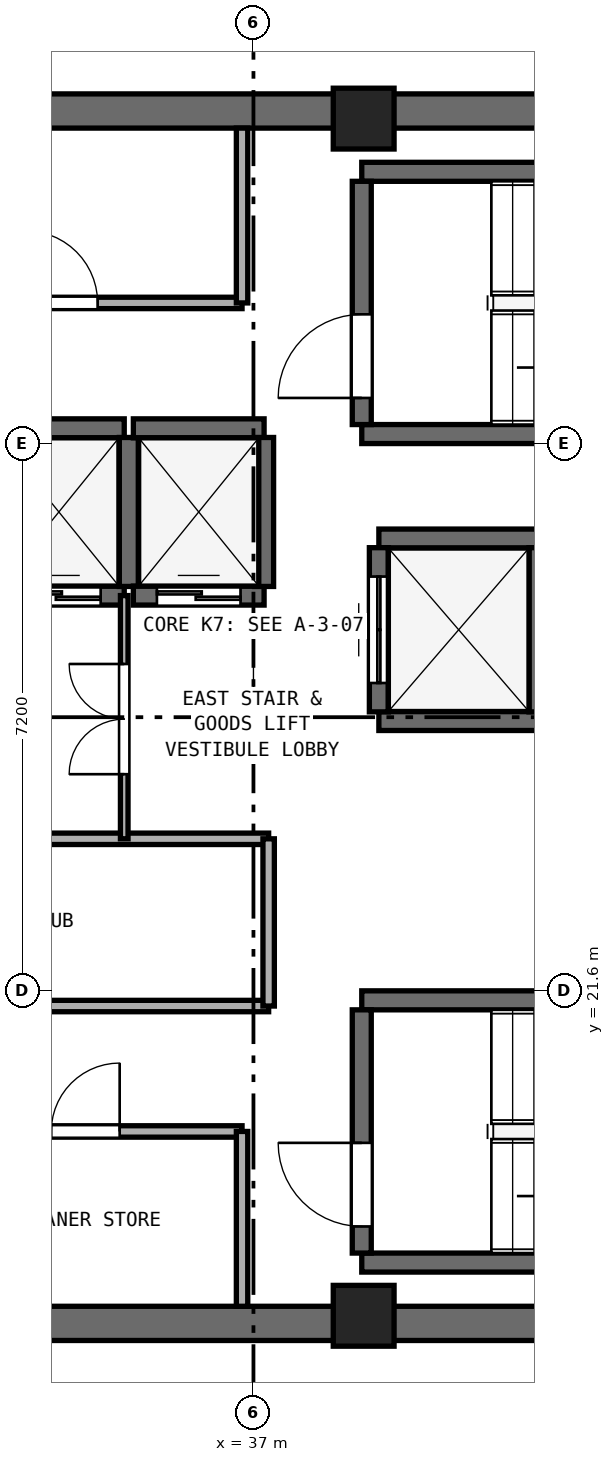
"""IFC4 building model, lengths in metres.
Left out: names, types, materials, properties, quantities, classifications, styles, units other than length and angle.
Written with IfcOpenShell. Run it as: python <this file> out.ifc"""

import sys

from ifc_helpers import new_model, si_unit, direction, frame, frame_2d, origin, origin_2d, place, context, subcontext, project, spatial, rectangle, extrude, element, fill, save


model = new_model("IFC4")
c1 = context("Model", 3, precision=1e-05, world=origin(), true_north=direction((0.0, 1.0)))
c2 = subcontext(c1, "Body", "Model", "MODEL_VIEW")
j1 = project(units=[si_unit("LENGTHUNIT", "METRE"), si_unit("PLANEANGLEUNIT", "RADIAN")], contexts=[c1])
p1 = place(None, origin())
s1 = spatial("IfcSite", under=j1, at=p1, CompositionType="ELEMENT")
p2 = place(p1, origin())
s2 = spatial("IfcBuilding", under=s1, at=p2, CompositionType="ELEMENT")
p3 = place(p2, frame((0.0, 0.0, 301.0)))
s3 = spatial("IfcBuildingStorey", under=s2, at=p3, CompositionType="ELEMENT", Elevation=301.0)
for number, where, z_axis, x_axis in (
    (1, (25.4, 17.225, 0.0), (0.0, 0.0, 1.0), (1.0, 0.0, 0.0)),
    (2, (25.4, 33.175, 0.0), (0.0, 0.0, 1.0), (1.0, 0.0, 0.0)),
):
    element("IfcWall", number, at=place(p3, frame(where, z_axis=z_axis, x_axis=x_axis)), inside=s3, PredefinedType="SHEAR", context=c2, shape_type="SweptSolid", body=[
        extrude(rectangle(XDim=23.2, YDim=0.45, at=frame_2d((11.6, 0.0))), origin(), (0.0, 0.0, 1.0), 3.54),
    ])
for number, where, z_axis, x_axis in (
    (3, (38.45, 17.325, 0.0), (0.0, 0.0, 1.0), (1.0, 0.0, 0.0)),
    (4, (38.45, 33.075, 0.0), (0.0, 0.0, 1.0), (1.0, 0.0, 0.0)),
):
    element("IfcColumn", number, at=place(p3, frame(where, z_axis=z_axis, x_axis=x_axis)), inside=s3, PredefinedType="PILASTER", context=c2, shape_type="SweptSolid", body=[
        extrude(rectangle(XDim=0.8, YDim=0.8, at=origin_2d()), origin(), (0.0, 0.0, 1.0), 3.8),
    ])
for number, where, z_axis, x_axis in (
    (5, (38.425, 28.925, 0.0), (0.0, 0.0, 1.0), (1.0, 0.0, 0.0)),
    (6, (38.425, 32.375, 0.0), (0.0, 0.0, 1.0), (1.0, 0.0, 0.0)),
):
    element("IfcWall", number, at=place(p3, frame(where, z_axis=z_axis, x_axis=x_axis)), inside=s3, PredefinedType="SHEAR", context=c2, shape_type="SweptSolid", body=[
        extrude(rectangle(XDim=7.3, YDim=0.25, at=frame_2d((3.65, 0.0))), origin(), (0.0, 0.0, 1.0), 3.54),
    ])
p4 = place(p3, frame((38.425, 29.05, 0.0), z_axis=(0.0, 0.0, 1.0), x_axis=(0.0, 1.0, 0.0)))
e7 = element("IfcWall", 7, at=p4, inside=s3, PredefinedType="SHEAR", context=c2, shape_type="SweptSolid", body=[
    extrude(rectangle(XDim=3.2, YDim=0.25, at=frame_2d((1.6, 0.0))), origin(), (0.0, 0.0, 1.0), 3.54),
])
p5 = place(p4, frame((0.35, 0.0, 0.0)))
e8 = element("IfcOpeningElement", 8, at=p5, cuts=e7, PredefinedType="OPENING", context=c2, shape_type="SweptSolid", body=[
    extrude(rectangle(XDim=1.1, YDim=2.15, at=frame_2d((0.55, 1.075))), frame((0.0, 0.135, 0.0), z_axis=(0.0, -1.0, 0.0), x_axis=(1.0, 0.0, 0.0)), (0.0, 0.0, 1.0), 0.27),
])
for number, where, z_axis, x_axis in (
    (9, (38.425, 18.025, 0.0), (0.0, 0.0, 1.0), (1.0, 0.0, 0.0)),
    (10, (38.425, 21.475, 0.0), (0.0, 0.0, 1.0), (1.0, 0.0, 0.0)),
):
    element("IfcWall", number, at=place(p3, frame(where, z_axis=z_axis, x_axis=x_axis)), inside=s3, PredefinedType="SHEAR", context=c2, shape_type="SweptSolid", body=[
        extrude(rectangle(XDim=7.3, YDim=0.25, at=frame_2d((3.65, 0.0))), origin(), (0.0, 0.0, 1.0), 3.54),
    ])
p6 = place(p3, frame((38.425, 18.15, 0.0), z_axis=(0.0, 0.0, 1.0), x_axis=(0.0, 1.0, 0.0)))
e11 = element("IfcWall", 11, at=p6, inside=s3, PredefinedType="SHEAR", context=c2, shape_type="SweptSolid", body=[
    extrude(rectangle(XDim=3.2, YDim=0.25, at=frame_2d((1.6, 0.0))), origin(), (0.0, 0.0, 1.0), 3.54),
])
p7 = place(p6, frame((0.35, 0.0, 0.0)))
e12 = element("IfcOpeningElement", 12, at=p7, cuts=e11, PredefinedType="OPENING", context=c2, shape_type="SweptSolid", body=[
    extrude(rectangle(XDim=1.1, YDim=2.15, at=frame_2d((0.55, 1.075))), frame((0.0, 0.135, 0.0), z_axis=(0.0, -1.0, 0.0), x_axis=(1.0, 0.0, 0.0)), (0.0, 0.0, 1.0), 0.27),
])
p8 = place(p3, frame((33.58, 26.8, 0.0), z_axis=(0.0, 0.0, 1.0), x_axis=(1.0, 0.0, 0.0)))
e13 = element("IfcWall", 13, at=p8, inside=s3, PredefinedType="SHEAR", context=c2, shape_type="SweptSolid", body=[
    extrude(rectangle(XDim=1.72, YDim=0.25, at=frame_2d((0.86, 0.0))), origin(), (0.0, 0.0, 1.0), 3.54),
])
p9 = place(p8, frame((0.31, 0.0, 0.0)))
e14 = element("IfcOpeningElement", 14, at=p9, cuts=e13, PredefinedType="OPENING", context=c2, shape_type="SweptSolid", body=[
    extrude(rectangle(XDim=1.1, YDim=2.15, at=frame_2d((0.55, 1.075))), frame((0.0, 0.135, 0.0), z_axis=(0.0, -1.0, 0.0), x_axis=(1.0, 0.0, 0.0)), (0.0, 0.0, 1.0), 0.27),
])
p10 = place(p3, frame((33.58, 29.0, 0.0), z_axis=(0.0, 0.0, 1.0), x_axis=(1.0, 0.0, 0.0)))
e15 = element("IfcWall", 15, at=p10, inside=s3, PredefinedType="SHEAR", context=c2, shape_type="SweptSolid", body=[
    extrude(rectangle(XDim=1.72, YDim=0.25, at=frame_2d((0.86, 0.0))), origin(), (0.0, 0.0, 1.0), 3.54),
])
p11 = place(p3, frame((35.36, 26.92, 0.0), z_axis=(0.0, 0.0, 1.0), x_axis=(0.0, 1.0, 0.0)))
e16 = element("IfcWall", 16, at=p11, inside=s3, PredefinedType="SHEAR", context=c2, shape_type="SweptSolid", body=[
    extrude(rectangle(XDim=1.96, YDim=0.25, at=frame_2d((0.98, 0.0))), origin(), (0.0, 0.0, 1.0), 3.54),
])
p12 = place(p3, frame((35.42, 26.8, 0.0), z_axis=(0.0, 0.0, 1.0), x_axis=(1.0, 0.0, 0.0)))
e17 = element("IfcWall", 17, at=p12, inside=s3, PredefinedType="SHEAR", context=c2, shape_type="SweptSolid", body=[
    extrude(rectangle(XDim=1.72, YDim=0.25, at=frame_2d((0.86, 0.0))), origin(), (0.0, 0.0, 1.0), 3.54),
])
p13 = place(p12, frame((0.31, 0.0, 0.0)))
e18 = element("IfcOpeningElement", 18, at=p13, cuts=e17, PredefinedType="OPENING", context=c2, shape_type="SweptSolid", body=[
    extrude(rectangle(XDim=1.1, YDim=2.15, at=frame_2d((0.55, 1.075))), frame((0.0, 0.135, 0.0), z_axis=(0.0, -1.0, 0.0), x_axis=(1.0, 0.0, 0.0)), (0.0, 0.0, 1.0), 0.27),
])
p14 = place(p3, frame((35.42, 29.0, 0.0), z_axis=(0.0, 0.0, 1.0), x_axis=(1.0, 0.0, 0.0)))
e19 = element("IfcWall", 19, at=p14, inside=s3, PredefinedType="SHEAR", context=c2, shape_type="SweptSolid", body=[
    extrude(rectangle(XDim=1.72, YDim=0.25, at=frame_2d((0.86, 0.0))), origin(), (0.0, 0.0, 1.0), 3.54),
])
p15 = place(p3, frame((37.14, 26.92, 0.0), z_axis=(0.0, 0.0, 1.0), x_axis=(0.0, 1.0, 0.0)))
e20 = element("IfcWall", 20, at=p15, inside=s3, PredefinedType="SHEAR", context=c2, shape_type="SweptSolid", body=[
    extrude(rectangle(XDim=1.96, YDim=0.25, at=frame_2d((0.98, 0.0))), origin(), (0.0, 0.0, 1.0), 3.54),
])
for number, where, z_axis, x_axis in (
    (21, (38.65, 25.15, 0.0), (0.0, 0.0, 1.0), (1.0, 0.0, 0.0)),
    (22, (38.65, 27.55, 0.0), (0.0, 0.0, 1.0), (1.0, 0.0, 0.0)),
):
    element("IfcWall", number, at=place(p3, frame(where, z_axis=z_axis, x_axis=x_axis)), inside=s3, PredefinedType="SHEAR", context=c2, shape_type="SweptSolid", body=[
        extrude(rectangle(XDim=2.1, YDim=0.25, at=frame_2d((1.05, 0.0))), origin(), (0.0, 0.0, 1.0), 3.54),
    ])
p16 = place(p3, frame((38.65, 25.27, 0.0), z_axis=(0.0, 0.0, 1.0), x_axis=(0.0, 1.0, 0.0)))
e23 = element("IfcWall", 23, at=p16, inside=s3, PredefinedType="SHEAR", context=c2, shape_type="SweptSolid", body=[
    extrude(rectangle(XDim=2.16, YDim=0.25, at=frame_2d((1.08, 0.0))), origin(), (0.0, 0.0, 1.0), 3.54),
])
p17 = place(p16, frame((0.38, 0.0, 0.0)))
e24 = element("IfcOpeningElement", 24, at=p17, cuts=e23, PredefinedType="OPENING", context=c2, shape_type="SweptSolid", body=[
    extrude(rectangle(XDim=1.4, YDim=2.2, at=frame_2d((0.7, 1.1))), frame((0.0, 0.135, 0.0), z_axis=(0.0, -1.0, 0.0), x_axis=(1.0, 0.0, 0.0)), (0.0, 0.0, 1.0), 0.27),
])
p18 = place(p3, frame((40.75, 25.27, 0.0), z_axis=(0.0, 0.0, 1.0), x_axis=(0.0, 1.0, 0.0)))
e25 = element("IfcWall", 25, at=p18, inside=s3, PredefinedType="SHEAR", context=c2, shape_type="SweptSolid", body=[
    extrude(rectangle(XDim=2.16, YDim=0.25, at=frame_2d((1.08, 0.0))), origin(), (0.0, 0.0, 1.0), 3.54),
])
p19 = place(p3, frame((32.1, 30.65, 0.0), z_axis=(0.0, 0.0, 1.0), x_axis=(1.0, 0.0, 0.0)))
e26 = element("IfcWall", 26, at=p19, inside=s3, PredefinedType="PARTITIONING", context=c2, shape_type="SweptSolid", body=[
    extrude(rectangle(XDim=4.75, YDim=0.15, at=frame_2d((2.375, 0.0))), origin(), (0.0, 0.0, 1.0), 3.54),
])
p20 = place(p19, frame((1.9, 0.0, 0.0)))
e27 = element("IfcOpeningElement", 27, at=p20, cuts=e26, PredefinedType="OPENING", context=c2, shape_type="SweptSolid", body=[
    extrude(rectangle(XDim=0.95, YDim=2.1, at=frame_2d((0.475, 1.05))), frame((0.0, 0.085, 0.0), z_axis=(0.0, -1.0, 0.0), x_axis=(1.0, 0.0, 0.0)), (0.0, 0.0, 1.0), 0.17),
])
p21 = place(p3, frame((36.85, 30.65, 0.0), z_axis=(0.0, 0.0, 1.0), x_axis=(0.0, 1.0, 0.0)))
e28 = element("IfcWall", 28, at=p21, inside=s3, PredefinedType="PARTITIONING", context=c2, shape_type="SweptSolid", body=[
    extrude(rectangle(XDim=2.3, YDim=0.15, at=frame_2d((1.15, 0.0))), origin(), (0.0, 0.0, 1.0), 3.54),
])
p22 = place(p3, frame((32.73, 19.75, 0.0), z_axis=(0.0, 0.0, 1.0), x_axis=(1.0, 0.0, 0.0)))
e29 = element("IfcWall", 29, at=p22, inside=s3, PredefinedType="PARTITIONING", context=c2, shape_type="SweptSolid", body=[
    extrude(rectangle(XDim=4.12, YDim=0.15, at=frame_2d((2.06, 0.0))), origin(), (0.0, 0.0, 1.0), 3.54),
])
p23 = place(p22, frame((1.61, 0.0, 0.0)))
e30 = element("IfcOpeningElement", 30, at=p23, cuts=e29, PredefinedType="OPENING", context=c2, shape_type="SweptSolid", body=[
    extrude(rectangle(XDim=0.9, YDim=2.1, at=frame_2d((0.45, 1.05))), frame((0.0, 0.085, 0.0), z_axis=(0.0, -1.0, 0.0), x_axis=(1.0, 0.0, 0.0)), (0.0, 0.0, 1.0), 0.17),
])
p24 = place(p3, frame((36.85, 17.45, 0.0), z_axis=(0.0, 0.0, 1.0), x_axis=(0.0, 1.0, 0.0)))
e31 = element("IfcWall", 31, at=p24, inside=s3, PredefinedType="PARTITIONING", context=c2, shape_type="SweptSolid", body=[
    extrude(rectangle(XDim=2.3, YDim=0.15, at=frame_2d((1.15, 0.0))), origin(), (0.0, 0.0, 1.0), 3.54),
])
p25 = place(p3, frame((30.08, 21.4, 0.0), z_axis=(0.0, 0.0, 1.0), x_axis=(1.0, 0.0, 0.0)))
e32 = element("IfcWall", 32, at=p25, inside=s3, PredefinedType="PARTITIONING", context=c2, shape_type="SweptSolid", body=[
    extrude(rectangle(XDim=7.12, YDim=0.15, at=frame_2d((3.56, 0.0))), origin(), (0.0, 0.0, 1.0), 3.54),
])
p26 = place(p3, frame((30.08, 23.6, 0.0), z_axis=(0.0, 0.0, 1.0), x_axis=(1.0, 0.0, 0.0)))
e33 = element("IfcWall", 33, at=p26, inside=s3, PredefinedType="PARTITIONING", context=c2, shape_type="SweptSolid", body=[
    extrude(rectangle(XDim=7.12, YDim=0.15, at=frame_2d((3.56, 0.0))), origin(), (0.0, 0.0, 1.0), 3.54),
])
p27 = place(p26, frame((3.11, 0.0, 0.0)))
e34 = element("IfcOpeningElement", 34, at=p27, cuts=e33, PredefinedType="OPENING", context=c2, shape_type="SweptSolid", body=[
    extrude(rectangle(XDim=0.9, YDim=2.1, at=frame_2d((0.45, 1.05))), frame((0.0, 0.085, 0.0), z_axis=(0.0, -1.0, 0.0), x_axis=(1.0, 0.0, 0.0)), (0.0, 0.0, 1.0), 0.17),
])
p28 = place(p3, frame((37.2, 21.4, 0.0), z_axis=(0.0, 0.0, 1.0), x_axis=(0.0, 1.0, 0.0)))
e35 = element("IfcWall", 35, at=p28, inside=s3, PredefinedType="PARTITIONING", context=c2, shape_type="SweptSolid", body=[
    extrude(rectangle(XDim=2.2, YDim=0.15, at=frame_2d((1.1, 0.0))), origin(), (0.0, 0.0, 1.0), 3.54),
])
p29 = place(p3, frame((35.3, 23.6, 0.0), z_axis=(0.0, 0.0, 1.0), x_axis=(0.0, 1.0, 0.0)))
e36 = element("IfcWall", 36, at=p29, inside=s3, PredefinedType="PARTITIONING", context=c2, shape_type="SweptSolid", body=[
    extrude(rectangle(XDim=3.2, YDim=0.1, at=frame_2d((1.6, 0.0))), origin(), (0.0, 0.0, 1.0), 3.54),
])
p30 = place(p29, frame((0.85, 0.0, 0.0)))
e37 = element("IfcOpeningElement", 37, at=p30, cuts=e36, PredefinedType="OPENING", context=c2, shape_type="SweptSolid", body=[
    extrude(rectangle(XDim=1.45, YDim=2.12, at=frame_2d((0.725, 1.06))), frame((0.0, 0.06, 0.0), z_axis=(0.0, -1.0, 0.0), x_axis=(1.0, 0.0, 0.0)), (0.0, 0.0, 1.0), 0.12),
])
p31 = place(p5, origin())
e38 = element("IfcDoor", 38, at=p31, inside=s3, OperationType="SINGLE_SWING_LEFT", PredefinedType="DOOR", context=c2, shape_type="SweptSolid", body=[
    extrude(rectangle(XDim=1.1, YDim=2.15, at=frame_2d((0.55, 1.075))), frame((0.0, 0.025, 0.0), z_axis=(0.0, -1.0, 0.0), x_axis=(1.0, 0.0, 0.0)), (0.0, 0.0, 1.0), 0.05),
])
fill(e8, e38)
p32 = place(p7, origin())
e39 = element("IfcDoor", 39, at=p32, inside=s3, OperationType="SINGLE_SWING_RIGHT", PredefinedType="DOOR", context=c2, shape_type="SweptSolid", body=[
    extrude(rectangle(XDim=1.1, YDim=2.15, at=frame_2d((0.55, 1.075))), frame((0.0, 0.025, 0.0), z_axis=(0.0, -1.0, 0.0), x_axis=(1.0, 0.0, 0.0)), (0.0, 0.0, 1.0), 0.05),
])
fill(e12, e39)
p33 = place(p9, origin())
e40 = element("IfcDoor", 40, at=p33, inside=s3, OperationType="DOUBLE_DOOR_SLIDING", PredefinedType="DOOR", context=c2, shape_type="SweptSolid", body=[
    extrude(rectangle(XDim=1.1, YDim=2.15, at=frame_2d((0.55, 1.075))), frame((0.0, 0.025, 0.0), z_axis=(0.0, -1.0, 0.0), x_axis=(1.0, 0.0, 0.0)), (0.0, 0.0, 1.0), 0.05),
])
fill(e14, e40)
p34 = place(p13, origin())
e41 = element("IfcDoor", 41, at=p34, inside=s3, OperationType="DOUBLE_DOOR_SLIDING", PredefinedType="DOOR", context=c2, shape_type="SweptSolid", body=[
    extrude(rectangle(XDim=1.1, YDim=2.15, at=frame_2d((0.55, 1.075))), frame((0.0, 0.025, 0.0), z_axis=(0.0, -1.0, 0.0), x_axis=(1.0, 0.0, 0.0)), (0.0, 0.0, 1.0), 0.05),
])
fill(e18, e41)
p35 = place(p17, origin())
e42 = element("IfcDoor", 42, at=p35, inside=s3, OperationType="DOUBLE_DOOR_SLIDING", PredefinedType="DOOR", context=c2, shape_type="SweptSolid", body=[
    extrude(rectangle(XDim=1.4, YDim=2.2, at=frame_2d((0.7, 1.1))), frame((0.0, 0.025, 0.0), z_axis=(0.0, -1.0, 0.0), x_axis=(1.0, 0.0, 0.0)), (0.0, 0.0, 1.0), 0.05),
])
fill(e24, e42)
p36 = place(p20, origin())
e43 = element("IfcDoor", 43, at=p36, inside=s3, OperationType="SINGLE_SWING_LEFT", PredefinedType="DOOR", context=c2, shape_type="SweptSolid", body=[
    extrude(rectangle(XDim=0.95, YDim=2.1, at=frame_2d((0.475, 1.05))), frame((0.0, 0.025, 0.0), z_axis=(0.0, -1.0, 0.0), x_axis=(1.0, 0.0, 0.0)), (0.0, 0.0, 1.0), 0.05),
])
fill(e27, e43)
p37 = place(p23, origin())
e44 = element("IfcDoor", 44, at=p37, inside=s3, OperationType="SINGLE_SWING_RIGHT", PredefinedType="DOOR", context=c2, shape_type="SweptSolid", body=[
    extrude(rectangle(XDim=0.9, YDim=2.1, at=frame_2d((0.45, 1.05))), frame((0.0, 0.025, 0.0), z_axis=(0.0, -1.0, 0.0), x_axis=(1.0, 0.0, 0.0)), (0.0, 0.0, 1.0), 0.05),
])
fill(e30, e44)
p38 = place(p30, origin())
e45 = element("IfcDoor", 45, at=p38, inside=s3, OperationType="DOUBLE_DOOR_SINGLE_SWING", PredefinedType="DOOR", context=c2, shape_type="SweptSolid", body=[
    extrude(rectangle(XDim=1.45, YDim=2.12, at=frame_2d((0.725, 1.06))), frame((0.0, 0.025, 0.0), z_axis=(0.0, -1.0, 0.0), x_axis=(1.0, 0.0, 0.0)), (0.0, 0.0, 1.0), 0.05),
])
fill(e37, e45)
save(model, sys.argv[1])
